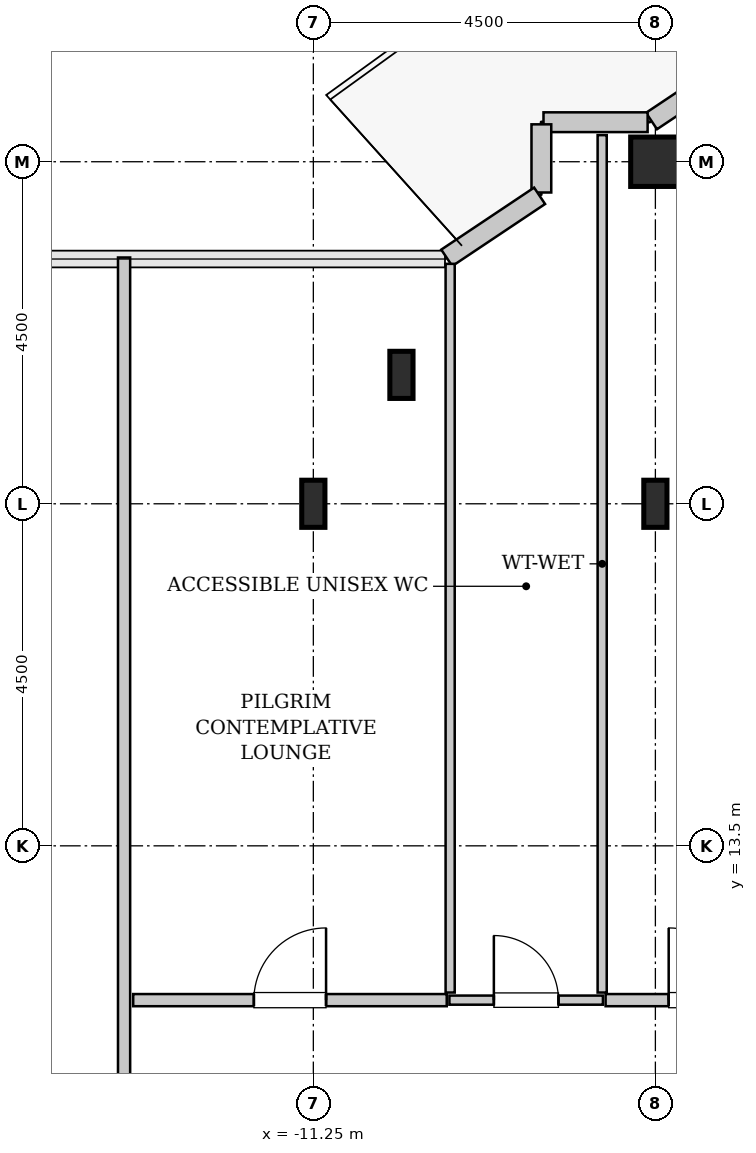
"""IFC4 building model, lengths in metres.
Left out: names, types, materials, properties, quantities, classifications, styles, units other than length and angle.
Written with IfcOpenShell. Run it as: python <this file> out.ifc"""

import sys

from ifc_helpers import new_model, si_unit, direction, frame, frame_2d, origin, origin_2d, place, context, subcontext, project, spatial, rectangle, hollow_rectangle, i_section, extrude, source, transform, mapped, element, fill, save


model = new_model("IFC4")
c1 = context("Model", 3, precision=1e-05, world=origin(), true_north=direction((0.0, 1.0)))
c2 = subcontext(c1, "Body", "Model", "MODEL_VIEW")
j1 = project(units=[si_unit("LENGTHUNIT", "METRE"), si_unit("PLANEANGLEUNIT", "RADIAN")], contexts=[c1])
p1 = place(None, origin())
s1 = spatial("IfcSite", under=j1, at=p1, CompositionType="ELEMENT")
p2 = place(p1, origin())
s2 = spatial("IfcBuilding", under=s1, at=p2, CompositionType="ELEMENT")
p3 = place(p2, frame((0.0, 0.0, 276.0)))
s3 = spatial("IfcBuildingStorey", under=s2, at=p3, CompositionType="ELEMENT", Elevation=276.0)
m1 = source(origin(), c2, "Body", "SweptSolid", [
    extrude(i_section(OverallWidth=0.305, OverallDepth=0.62, WebThickness=0.021, FlangeThickness=0.04, FilletRadius=0.027, at=origin_2d()), origin(), (0.0, 0.0, 1.0), 3.8),
])
for number, where, z_axis, x_axis in (
    (1, (-11.25, 18.0, 0.0), (0.0, 0.0, 1.0), (1.0, 0.0, 0.0)),
    (2, (-10.091, 19.696, 0.0), (0.0, 0.0, 1.0), (1.0, 0.0, 0.0)),
    (3, (-6.75, 18.0, 0.0), (0.0, 0.0, 1.0), (1.0, 0.0, 0.0)),
):
    element("IfcColumn", number, at=place(p3, frame(where, z_axis=z_axis, x_axis=x_axis)), inside=s3, PredefinedType="COLUMN", context=c2, shape_type="MappedRepresentation", body=[
        mapped(m1, transform((0.0, 0.0, 0.0), x_axis=(1.0, 0.0, 0.0), y_axis=(0.0, 1.0, 0.0), z_axis=(0.0, 0.0, 1.0), scale=1.0)),
    ])
m2 = source(origin(), c2, "Body", "SweptSolid", [
    extrude(hollow_rectangle(XDim=0.65, YDim=0.65, WallThickness=0.032, InnerFilletRadius=0.032, OuterFilletRadius=0.064, at=origin_2d()), origin(), (0.0, 0.0, 1.0), 3.8),
])
p4 = place(p3, frame((-6.75, 22.5, 0.0), z_axis=(0.0, 0.0, 1.0), x_axis=(1.0, 0.0, 0.0)))
e4 = element("IfcColumn", 4, at=p4, inside=s3, PredefinedType="COLUMN", context=c2, shape_type="MappedRepresentation", body=[
    mapped(m2, transform((0.0, 0.0, 0.0), x_axis=(1.0, 0.0, 0.0), y_axis=(0.0, 1.0, 0.0), z_axis=(0.0, 0.0, 1.0), scale=1.0)),
])
m3 = source(origin(), c2, "Body", "SweptSolid", [
    extrude(rectangle(XDim=0.565, YDim=0.26, at=frame_2d((0.283, 0.0))), origin(), (0.0, 0.0, 1.0), 3.55),
])
p5 = place(p3, frame((-6.331, 23.35, 0.0), z_axis=(0.0, 0.0, 1.0), x_axis=(-0.831651492666, -0.555297933317, 0.0)))
e5 = element("IfcWall", 5, at=p5, inside=s3, PredefinedType="SOLIDWALL", context=c2, shape_type="MappedRepresentation", body=[
    mapped(m3, transform((0.0, 0.0, 0.0), x_axis=(1.0, 0.0, 0.0), y_axis=(0.0, 1.0, 0.0), z_axis=(0.0, 0.0, 1.0), scale=1.0)),
])
m4 = source(origin(), c2, "Body", "SweptSolid", [
    extrude(rectangle(XDim=1.37, YDim=0.26, at=frame_2d((0.685, 0.0))), origin(), (0.0, 0.0, 1.0), 3.55),
])
p6 = place(p3, frame((-6.852, 23.02, 0.0), z_axis=(0.0, 0.0, 1.0), x_axis=(-1.0, 0.0, 0.0)))
e6 = element("IfcWall", 6, at=p6, inside=s3, PredefinedType="SOLIDWALL", context=c2, shape_type="MappedRepresentation", body=[
    mapped(m4, transform((0.0, 0.0, 0.0), x_axis=(1.0, 0.0, 0.0), y_axis=(0.0, 1.0, 0.0), z_axis=(0.0, 0.0, 1.0), scale=1.0)),
])
m5 = source(origin(), c2, "Body", "SweptSolid", [
    extrude(rectangle(XDim=0.897, YDim=0.26, at=frame_2d((0.448, 0.0))), origin(), (0.0, 0.0, 1.0), 3.55),
])
p7 = place(p3, frame((-8.25, 22.992, 0.0), z_axis=(0.0, 0.0, 1.0), x_axis=(0.0, -1.0, 0.0)))
e7 = element("IfcWall", 7, at=p7, inside=s3, PredefinedType="SOLIDWALL", context=c2, shape_type="MappedRepresentation", body=[
    mapped(m5, transform((0.0, 0.0, 0.0), x_axis=(1.0, 0.0, 0.0), y_axis=(0.0, 1.0, 0.0), z_axis=(0.0, 0.0, 1.0), scale=1.0)),
])
m6 = source(origin(), c2, "Body", "SweptSolid", [
    extrude(rectangle(XDim=1.469, YDim=0.26, at=frame_2d((0.734, 0.0))), origin(), (0.0, 0.0, 1.0), 3.55),
])
p8 = place(p3, frame((-8.273, 22.052, 0.0), z_axis=(0.0, 0.0, 1.0), x_axis=(-0.831461760506, -0.555581983884, 0.0)))
e8 = element("IfcWall", 8, at=p8, inside=s3, PredefinedType="SOLIDWALL", context=c2, shape_type="MappedRepresentation", body=[
    mapped(m6, transform((0.0, 0.0, 0.0), x_axis=(1.0, 0.0, 0.0), y_axis=(0.0, 1.0, 0.0), z_axis=(0.0, 0.0, 1.0), scale=1.0)),
])
m7 = source(origin(), c2, "Body", "SweptSolid", [
    extrude(rectangle(XDim=2.02, YDim=0.12, at=frame_2d((1.01, 0.0))), origin(), (0.0, 0.0, 1.0), 3.535),
])
p9 = place(p3, frame((-9.46, 11.47, 0.0), z_axis=(0.0, 0.0, 1.0), x_axis=(1.0, 0.0, 0.0)))
e9 = element("IfcWall", 9, at=p9, inside=s3, PredefinedType="PLUMBINGWALL", context=c2, shape_type="MappedRepresentation", body=[
    mapped(m7, transform((0.0, 0.0, 0.0), x_axis=(1.0, 0.0, 0.0), y_axis=(0.0, 1.0, 0.0), z_axis=(0.0, 0.0, 1.0), scale=1.0)),
])
p10 = place(p9, frame((0.585, 0.0, 0.0)))
e10 = element("IfcOpeningElement", 10, at=p10, cuts=e9, PredefinedType="OPENING", context=c2, shape_type="SweptSolid", body=[
    extrude(rectangle(XDim=0.85, YDim=2.1, at=frame_2d((0.425, 1.05))), frame((0.0, 0.07, 0.0), z_axis=(0.0, -1.0, 0.0), x_axis=(1.0, 0.0, 0.0)), (0.0, 0.0, 1.0), 0.14),
])
m8 = source(origin(), c2, "Body", "SweptSolid", [
    extrude(rectangle(XDim=11.28, YDim=0.12, at=frame_2d((5.64, 0.0))), origin(), (0.0, 0.0, 1.0), 3.535),
])
p11 = place(p3, frame((-7.45, 11.57, 0.0), z_axis=(0.0, 0.0, 1.0), x_axis=(0.0, 1.0, 0.0)))
e11 = element("IfcWall", 11, at=p11, inside=s3, PredefinedType="PLUMBINGWALL", context=c2, shape_type="MappedRepresentation", body=[
    mapped(m8, transform((0.0, 0.0, 0.0), x_axis=(1.0, 0.0, 0.0), y_axis=(0.0, 1.0, 0.0), z_axis=(0.0, 0.0, 1.0), scale=1.0)),
])
m9 = source(origin(), c2, "Body", "SweptSolid", [
    extrude(rectangle(XDim=9.587, YDim=0.12, at=frame_2d((4.793, 0.0))), origin(), (0.0, 0.0, 1.0), 3.535),
])
p12 = place(p3, frame((-9.45, 11.57, 0.0), z_axis=(0.0, 0.0, 1.0), x_axis=(0.0, 1.0, 0.0)))
e12 = element("IfcWall", 12, at=p12, inside=s3, PredefinedType="PLUMBINGWALL", context=c2, shape_type="MappedRepresentation", body=[
    mapped(m9, transform((0.0, 0.0, 0.0), x_axis=(1.0, 0.0, 0.0), y_axis=(0.0, 1.0, 0.0), z_axis=(0.0, 0.0, 1.0), scale=1.0)),
])
m10 = source(origin(), c2, "Body", "SweptSolid", [
    extrude(rectangle(XDim=12.845, YDim=0.16, at=frame_2d((6.422, 0.0))), origin(), (0.0, 0.0, 1.0), 3.535),
])
p13 = place(p3, frame((-13.74, 8.395, 0.0), z_axis=(0.0, 0.0, 1.0), x_axis=(0.0, 1.0, 0.0)))
e13 = element("IfcWall", 13, at=p13, inside=s3, PredefinedType="PARTITIONING", context=c2, shape_type="MappedRepresentation", body=[
    mapped(m10, transform((0.0, 0.0, 0.0), x_axis=(1.0, 0.0, 0.0), y_axis=(0.0, 1.0, 0.0), z_axis=(0.0, 0.0, 1.0), scale=1.0)),
])
p14 = place(p13, frame((1.083, 0.0, 0.0)))
e14 = element("IfcOpeningElement", 14, at=p14, cuts=e13, PredefinedType="OPENING", context=c2, shape_type="SweptSolid", body=[
    extrude(rectangle(XDim=0.95, YDim=2.1, at=frame_2d((0.475, 1.05))), frame((0.0, 0.09, 0.0), z_axis=(0.0, -1.0, 0.0), x_axis=(1.0, 0.0, 0.0)), (0.0, 0.0, 1.0), 0.18),
])
m11 = source(origin(), c2, "Body", "SweptSolid", [
    extrude(rectangle(XDim=4.125, YDim=0.16, at=frame_2d((2.062, 0.0))), origin(), (0.0, 0.0, 1.0), 3.535),
])
p15 = place(p3, frame((-13.62, 11.47, 0.0), z_axis=(0.0, 0.0, 1.0), x_axis=(1.0, 0.0, 0.0)))
e15 = element("IfcWall", 15, at=p15, inside=s3, PredefinedType="PARTITIONING", context=c2, shape_type="MappedRepresentation", body=[
    mapped(m11, transform((0.0, 0.0, 0.0), x_axis=(1.0, 0.0, 0.0), y_axis=(0.0, 1.0, 0.0), z_axis=(0.0, 0.0, 1.0), scale=1.0)),
])
p16 = place(p15, frame((1.587, 0.0, 0.0)))
e16 = element("IfcOpeningElement", 16, at=p16, cuts=e15, PredefinedType="OPENING", context=c2, shape_type="SweptSolid", body=[
    extrude(rectangle(XDim=0.95, YDim=2.1, at=frame_2d((0.475, 1.05))), frame((0.0, 0.09, 0.0), z_axis=(0.0, -1.0, 0.0), x_axis=(1.0, 0.0, 0.0)), (0.0, 0.0, 1.0), 0.18),
])
m12 = source(origin(), c2, "Body", "SweptSolid", [
    extrude(rectangle(XDim=2.61, YDim=0.16, at=frame_2d((1.305, 0.0))), origin(), (0.0, 0.0, 1.0), 3.535),
])
p17 = place(p3, frame((-7.405, 11.47, 0.0), z_axis=(0.0, 0.0, 1.0), x_axis=(1.0, 0.0, 0.0)))
e17 = element("IfcWall", 17, at=p17, inside=s3, PredefinedType="PARTITIONING", context=c2, shape_type="MappedRepresentation", body=[
    mapped(m12, transform((0.0, 0.0, 0.0), x_axis=(1.0, 0.0, 0.0), y_axis=(0.0, 1.0, 0.0), z_axis=(0.0, 0.0, 1.0), scale=1.0)),
])
p18 = place(p17, frame((0.83, 0.0, 0.0)))
e18 = element("IfcOpeningElement", 18, at=p18, cuts=e17, PredefinedType="OPENING", context=c2, shape_type="SweptSolid", body=[
    extrude(rectangle(XDim=0.95, YDim=2.1, at=frame_2d((0.475, 1.05))), frame((0.0, 0.09, 0.0), z_axis=(0.0, -1.0, 0.0), x_axis=(1.0, 0.0, 0.0)), (0.0, 0.0, 1.0), 0.18),
])
m13 = source(origin(), c2, "Body", "SweptSolid", [
    extrude(rectangle(XDim=0.85, YDim=2.1, at=frame_2d((0.425, 1.05))), frame((0.0, 0.025, 0.0), z_axis=(0.0, -1.0, 0.0), x_axis=(1.0, 0.0, 0.0)), (0.0, 0.0, 1.0), 0.05),
])
p19 = place(p10, origin())
e19 = element("IfcDoor", 19, at=p19, inside=s3, OperationType="SINGLE_SWING_LEFT", PredefinedType="DOOR", context=c2, shape_type="MappedRepresentation", body=[
    mapped(m13, transform((0.0, 0.0, 0.0), x_axis=(1.0, 0.0, 0.0), y_axis=(0.0, 1.0, 0.0), z_axis=(0.0, 0.0, 1.0), scale=1.0)),
])
fill(e10, e19)
m14 = source(origin(), c2, "Body", "SweptSolid", [
    extrude(rectangle(XDim=0.95, YDim=2.1, at=frame_2d((0.475, 1.05))), frame((0.0, 0.025, 0.0), z_axis=(0.0, -1.0, 0.0), x_axis=(1.0, 0.0, 0.0)), (0.0, 0.0, 1.0), 0.05),
])
p20 = place(p16, origin())
e20 = element("IfcDoor", 20, at=p20, inside=s3, OperationType="SINGLE_SWING_RIGHT", PredefinedType="DOOR", context=c2, shape_type="MappedRepresentation", body=[
    mapped(m14, transform((0.0, 0.0, 0.0), x_axis=(1.0, 0.0, 0.0), y_axis=(0.0, 1.0, 0.0), z_axis=(0.0, 0.0, 1.0), scale=1.0)),
])
fill(e16, e20)
p21 = place(p18, origin())
e21 = element("IfcDoor", 21, at=p21, inside=s3, OperationType="SINGLE_SWING_LEFT", PredefinedType="DOOR", context=c2, shape_type="MappedRepresentation", body=[
    mapped(m14, transform((0.0, 0.0, 0.0), x_axis=(1.0, 0.0, 0.0), y_axis=(0.0, 1.0, 0.0), z_axis=(0.0, 0.0, 1.0), scale=1.0)),
])
fill(e18, e21)
save(model, sys.argv[1])
